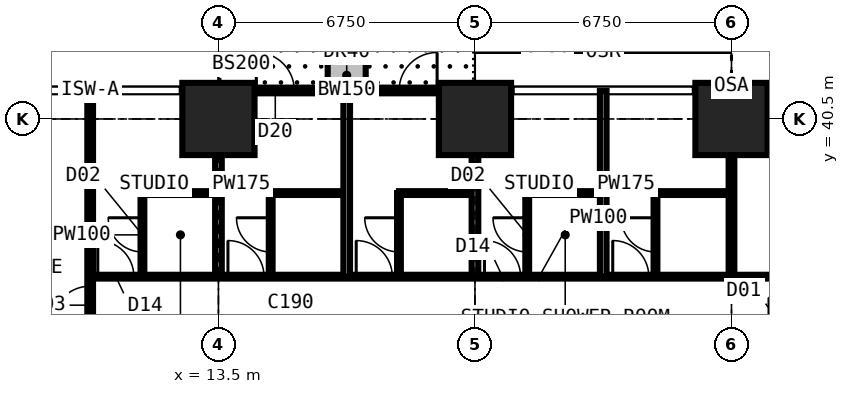
"""IFC4 building model, lengths in metres.
Left out: names, types, materials, properties, quantities, classifications, styles, units other than length and angle.
Written with IfcOpenShell. Run it as: python <this file> out.ifc"""

import sys

from ifc_helpers import new_model, si_unit, direction, frame, frame_2d, origin, origin_2d, place, context, subcontext, project, spatial, rectangle, extrude, element, fill, save


model = new_model("IFC4")
c1 = context("Model", 3, precision=1e-05, world=origin(), true_north=direction((0.0, 1.0)))
c2 = subcontext(c1, "Body", "Model", "MODEL_VIEW")
j1 = project(units=[si_unit("LENGTHUNIT", "METRE"), si_unit("PLANEANGLEUNIT", "RADIAN")], contexts=[c1])
p1 = place(None, origin())
s1 = spatial("IfcSite", under=j1, at=p1, CompositionType="ELEMENT")
p2 = place(p1, origin())
s2 = spatial("IfcBuilding", under=s1, at=p2, CompositionType="ELEMENT")
p3 = place(p2, frame((0.0, 0.0, 39.6)))
s3 = spatial("IfcBuildingStorey", under=s2, at=p3, CompositionType="ELEMENT", Elevation=39.6)
for number, where, z_axis, x_axis in (
    (1, (13.5, 40.5, 0.0), (0.0, 0.0, 1.0), (1.0, 0.0, 0.0)),
    (2, (20.25, 40.5, 0.0), (0.0, 0.0, 1.0), (1.0, 0.0, 0.0)),
    (3, (27.0, 40.5, 0.0), (0.0, 0.0, 1.0), (1.0, 0.0, 0.0)),
):
    element("IfcColumn", number, at=place(p3, frame(where, z_axis=z_axis, x_axis=x_axis)), inside=s3, PredefinedType="COLUMN", context=c2, shape_type="SweptSolid", body=[
        extrude(rectangle(XDim=1.9, YDim=1.9, at=origin_2d()), origin(), (0.0, 0.0, 1.0), 3.6),
    ])
p4 = place(p3, frame((13.5, 41.25, 0.0), z_axis=(0.0, 0.0, 1.0), x_axis=(1.0, 0.0, 0.0)))
e4 = element("IfcWall", 4, at=p4, inside=s3, PredefinedType="SOLIDWALL", context=c2, shape_type="SweptSolid", body=[
    extrude(rectangle(XDim=6.75, YDim=0.15, at=frame_2d((3.375, 0.0))), origin(), (0.0, 0.0, 1.0), 3.375),
])
p5 = place(p4, frame((0.996, 0.0, 0.0)))
e5 = element("IfcOpeningElement", 5, at=p5, cuts=e4, PredefinedType="OPENING", context=c2, shape_type="SweptSolid", body=[
    extrude(rectangle(XDim=1.0, YDim=2.2, at=frame_2d((0.5, 1.1))), frame((0.0, 0.085, 0.0), z_axis=(0.0, -1.0, 0.0), x_axis=(1.0, 0.0, 0.0)), (0.0, 0.0, 1.0), 0.17),
])
p6 = place(p4, frame((2.042, 0.0, 0.9)))
e6 = element("IfcOpeningElement", 6, at=p6, cuts=e4, PredefinedType="OPENING", context=c2, shape_type="SweptSolid", body=[
    extrude(rectangle(XDim=1.2, YDim=1.8, at=frame_2d((0.6, 0.9))), frame((0.0, 0.085, 0.0), z_axis=(0.0, -1.0, 0.0), x_axis=(1.0, 0.0, 0.0)), (0.0, 0.0, 1.0), 0.17),
])
p7 = place(p4, frame((4.754, 0.0, 0.0)))
e7 = element("IfcOpeningElement", 7, at=p7, cuts=e4, PredefinedType="OPENING", context=c2, shape_type="SweptSolid", body=[
    extrude(rectangle(XDim=1.0, YDim=2.2, at=frame_2d((0.5, 1.1))), frame((0.0, 0.085, 0.0), z_axis=(0.0, -1.0, 0.0), x_axis=(1.0, 0.0, 0.0)), (0.0, 0.0, 1.0), 0.17),
])
p8 = place(p4, frame((3.508, 0.0, 0.9)))
e8 = element("IfcOpeningElement", 8, at=p8, cuts=e4, PredefinedType="OPENING", context=c2, shape_type="SweptSolid", body=[
    extrude(rectangle(XDim=1.2, YDim=1.8, at=frame_2d((0.6, 0.9))), frame((0.0, 0.085, 0.0), z_axis=(0.0, -1.0, 0.0), x_axis=(1.0, 0.0, 0.0)), (0.0, 0.0, 1.0), 0.17),
])
p9 = place(p3, frame((16.875, 41.35, 0.0), z_axis=(0.0, 0.0, 1.0), x_axis=(0.0, 1.0, 0.0)))
e9 = element("IfcWall", 9, at=p9, inside=s3, PredefinedType="USERDEFINED", context=c2, shape_type="SweptSolid", body=[
    extrude(rectangle(XDim=2.2, YDim=1.0, at=frame_2d((1.1, 0.0))), origin(), (0.0, 0.0, 1.0), 0.9),
])
p10 = place(p3, frame((10.125, 30.375, 0.0), z_axis=(0.0, 0.0, 1.0), x_axis=(0.0, 1.0, 0.0)))
e10 = element("IfcWall", 10, at=p10, inside=s3, PredefinedType="PARTITIONING", context=c2, shape_type="SweptSolid", body=[
    extrude(rectangle(XDim=10.859, YDim=0.15, at=frame_2d((5.429, 0.0))), origin(), (0.0, 0.0, 1.0), 3.375),
])
p11 = place(p10, frame((4.725, 0.0, 0.0)))
e11 = element("IfcOpeningElement", 11, at=p11, cuts=e10, PredefinedType="OPENING", context=c2, shape_type="SweptSolid", body=[
    extrude(rectangle(XDim=1.0, YDim=2.2, at=frame_2d((0.5, 1.1))), frame((0.0, 0.085, 0.0), z_axis=(0.0, -1.0, 0.0), x_axis=(1.0, 0.0, 0.0)), (0.0, 0.0, 1.0), 0.17),
])
p12 = place(p3, frame((10.125, 36.35, 0.0), z_axis=(0.0, 0.0, 1.0), x_axis=(1.0, 0.0, 0.0)))
e12 = element("IfcWall", 12, at=p12, inside=s3, PredefinedType="PARTITIONING", context=c2, shape_type="SweptSolid", body=[
    extrude(rectangle(XDim=23.625, YDim=0.1, at=frame_2d((11.812, 0.0))), origin(), (0.0, 0.0, 1.0), 3.375),
])
p13 = place(p12, frame((0.2, 0.0, 0.0)))
e13 = element("IfcOpeningElement", 13, at=p13, cuts=e12, PredefinedType="OPENING", context=c2, shape_type="SweptSolid", body=[
    extrude(rectangle(XDim=0.95, YDim=2.2, at=frame_2d((0.475, 1.1))), frame((0.0, 0.06, 0.0), z_axis=(0.0, -1.0, 0.0), x_axis=(1.0, 0.0, 0.0)), (0.0, 0.0, 1.0), 0.12),
])
p14 = place(p12, frame((3.625, 0.0, 0.0)))
e14 = element("IfcOpeningElement", 14, at=p14, cuts=e12, PredefinedType="OPENING", context=c2, shape_type="SweptSolid", body=[
    extrude(rectangle(XDim=0.95, YDim=2.2, at=frame_2d((0.475, 1.1))), frame((0.0, 0.06, 0.0), z_axis=(0.0, -1.0, 0.0), x_axis=(1.0, 0.0, 0.0)), (0.0, 0.0, 1.0), 0.12),
])
p15 = place(p12, frame((7.0, 0.0, 0.0)))
e15 = element("IfcOpeningElement", 15, at=p15, cuts=e12, PredefinedType="OPENING", context=c2, shape_type="SweptSolid", body=[
    extrude(rectangle(XDim=0.95, YDim=2.2, at=frame_2d((0.475, 1.1))), frame((0.0, 0.06, 0.0), z_axis=(0.0, -1.0, 0.0), x_axis=(1.0, 0.0, 0.0)), (0.0, 0.0, 1.0), 0.12),
])
p16 = place(p12, frame((10.375, 0.0, 0.0)))
e16 = element("IfcOpeningElement", 16, at=p16, cuts=e12, PredefinedType="OPENING", context=c2, shape_type="SweptSolid", body=[
    extrude(rectangle(XDim=0.95, YDim=2.2, at=frame_2d((0.475, 1.1))), frame((0.0, 0.06, 0.0), z_axis=(0.0, -1.0, 0.0), x_axis=(1.0, 0.0, 0.0)), (0.0, 0.0, 1.0), 0.12),
])
p17 = place(p12, frame((13.75, 0.0, 0.0)))
e17 = element("IfcOpeningElement", 17, at=p17, cuts=e12, PredefinedType="OPENING", context=c2, shape_type="SweptSolid", body=[
    extrude(rectangle(XDim=0.95, YDim=2.2, at=frame_2d((0.475, 1.1))), frame((0.0, 0.06, 0.0), z_axis=(0.0, -1.0, 0.0), x_axis=(1.0, 0.0, 0.0)), (0.0, 0.0, 1.0), 0.12),
])
p18 = place(p3, frame((11.5, 36.35, 0.0), z_axis=(0.0, 0.0, 1.0), x_axis=(0.0, 1.0, 0.0)))
e18 = element("IfcWall", 18, at=p18, inside=s3, PredefinedType="PARTITIONING", context=c2, shape_type="SweptSolid", body=[
    extrude(rectangle(XDim=2.2, YDim=0.1, at=frame_2d((1.1, 0.0))), origin(), (0.0, 0.0, 1.0), 3.375),
])
p19 = place(p18, frame((0.65, 0.0, 0.0)))
e19 = element("IfcOpeningElement", 19, at=p19, cuts=e18, PredefinedType="OPENING", context=c2, shape_type="SweptSolid", body=[
    extrude(rectangle(XDim=0.9, YDim=2.2, at=frame_2d((0.45, 1.1))), frame((0.0, 0.06, 0.0), z_axis=(0.0, -1.0, 0.0), x_axis=(1.0, 0.0, 0.0)), (0.0, 0.0, 1.0), 0.12),
])
p20 = place(p3, frame((11.5, 38.55, 0.0), z_axis=(0.0, 0.0, 1.0), x_axis=(1.0, 0.0, 0.0)))
e20 = element("IfcWall", 20, at=p20, inside=s3, PredefinedType="PARTITIONING", context=c2, shape_type="SweptSolid", body=[
    extrude(rectangle(XDim=2.0, YDim=0.1, at=frame_2d((1.0, 0.0))), origin(), (0.0, 0.0, 1.0), 3.375),
])
p21 = place(p3, frame((13.5, 36.35, 0.0), z_axis=(0.0, 0.0, 1.0), x_axis=(0.0, 1.0, 0.0)))
e21 = element("IfcWall", 21, at=p21, inside=s3, PredefinedType="PARTITIONING", context=c2, shape_type="SweptSolid", body=[
    extrude(rectangle(XDim=4.884, YDim=0.175, at=frame_2d((2.442, 0.0))), origin(), (0.0, 0.0, 1.0), 2.877),
])
p22 = place(p3, frame((14.875, 36.35, 0.0), z_axis=(0.0, 0.0, 1.0), x_axis=(0.0, 1.0, 0.0)))
e22 = element("IfcWall", 22, at=p22, inside=s3, PredefinedType="PARTITIONING", context=c2, shape_type="SweptSolid", body=[
    extrude(rectangle(XDim=2.2, YDim=0.1, at=frame_2d((1.1, 0.0))), origin(), (0.0, 0.0, 1.0), 3.375),
])
p23 = place(p22, frame((0.65, 0.0, 0.0)))
e23 = element("IfcOpeningElement", 23, at=p23, cuts=e22, PredefinedType="OPENING", context=c2, shape_type="SweptSolid", body=[
    extrude(rectangle(XDim=0.9, YDim=2.2, at=frame_2d((0.45, 1.1))), frame((0.0, 0.06, 0.0), z_axis=(0.0, -1.0, 0.0), x_axis=(1.0, 0.0, 0.0)), (0.0, 0.0, 1.0), 0.12),
])
p24 = place(p3, frame((14.875, 38.55, 0.0), z_axis=(0.0, 0.0, 1.0), x_axis=(1.0, 0.0, 0.0)))
e24 = element("IfcWall", 24, at=p24, inside=s3, PredefinedType="PARTITIONING", context=c2, shape_type="SweptSolid", body=[
    extrude(rectangle(XDim=2.0, YDim=0.1, at=frame_2d((1.0, 0.0))), origin(), (0.0, 0.0, 1.0), 3.375),
])
p25 = place(p3, frame((16.875, 36.35, 0.0), z_axis=(0.0, 0.0, 1.0), x_axis=(0.0, 1.0, 0.0)))
e25 = element("IfcWall", 25, at=p25, inside=s3, PredefinedType="PARTITIONING", context=c2, shape_type="SweptSolid", body=[
    extrude(rectangle(XDim=4.884, YDim=0.175, at=frame_2d((2.442, 0.0))), origin(), (0.0, 0.0, 1.0), 3.375),
])
p26 = place(p3, frame((18.25, 36.35, 0.0), z_axis=(0.0, 0.0, 1.0), x_axis=(0.0, 1.0, 0.0)))
e26 = element("IfcWall", 26, at=p26, inside=s3, PredefinedType="PARTITIONING", context=c2, shape_type="SweptSolid", body=[
    extrude(rectangle(XDim=2.2, YDim=0.1, at=frame_2d((1.1, 0.0))), origin(), (0.0, 0.0, 1.0), 3.375),
])
p27 = place(p26, frame((0.65, 0.0, 0.0)))
e27 = element("IfcOpeningElement", 27, at=p27, cuts=e26, PredefinedType="OPENING", context=c2, shape_type="SweptSolid", body=[
    extrude(rectangle(XDim=0.9, YDim=2.2, at=frame_2d((0.45, 1.1))), frame((0.0, 0.06, 0.0), z_axis=(0.0, -1.0, 0.0), x_axis=(1.0, 0.0, 0.0)), (0.0, 0.0, 1.0), 0.12),
])
p28 = place(p3, frame((18.25, 38.55, 0.0), z_axis=(0.0, 0.0, 1.0), x_axis=(1.0, 0.0, 0.0)))
e28 = element("IfcWall", 28, at=p28, inside=s3, PredefinedType="PARTITIONING", context=c2, shape_type="SweptSolid", body=[
    extrude(rectangle(XDim=2.0, YDim=0.1, at=frame_2d((1.0, 0.0))), origin(), (0.0, 0.0, 1.0), 3.375),
])
p29 = place(p3, frame((20.25, 36.35, 0.0), z_axis=(0.0, 0.0, 1.0), x_axis=(0.0, 1.0, 0.0)))
e29 = element("IfcWall", 29, at=p29, inside=s3, PredefinedType="PARTITIONING", context=c2, shape_type="SweptSolid", body=[
    extrude(rectangle(XDim=4.884, YDim=0.175, at=frame_2d((2.442, 0.0))), origin(), (0.0, 0.0, 1.0), 2.61),
])
p30 = place(p3, frame((21.625, 36.35, 0.0), z_axis=(0.0, 0.0, 1.0), x_axis=(0.0, 1.0, 0.0)))
e30 = element("IfcWall", 30, at=p30, inside=s3, PredefinedType="PARTITIONING", context=c2, shape_type="SweptSolid", body=[
    extrude(rectangle(XDim=2.2, YDim=0.1, at=frame_2d((1.1, 0.0))), origin(), (0.0, 0.0, 1.0), 3.375),
])
p31 = place(p30, frame((0.65, 0.0, 0.0)))
e31 = element("IfcOpeningElement", 31, at=p31, cuts=e30, PredefinedType="OPENING", context=c2, shape_type="SweptSolid", body=[
    extrude(rectangle(XDim=0.9, YDim=2.2, at=frame_2d((0.45, 1.1))), frame((0.0, 0.06, 0.0), z_axis=(0.0, -1.0, 0.0), x_axis=(1.0, 0.0, 0.0)), (0.0, 0.0, 1.0), 0.12),
])
p32 = place(p3, frame((21.625, 38.55, 0.0), z_axis=(0.0, 0.0, 1.0), x_axis=(1.0, 0.0, 0.0)))
e32 = element("IfcWall", 32, at=p32, inside=s3, PredefinedType="PARTITIONING", context=c2, shape_type="SweptSolid", body=[
    extrude(rectangle(XDim=2.0, YDim=0.1, at=frame_2d((1.0, 0.0))), origin(), (0.0, 0.0, 1.0), 3.375),
])
p33 = place(p3, frame((23.625, 36.35, 0.0), z_axis=(0.0, 0.0, 1.0), x_axis=(0.0, 1.0, 0.0)))
e33 = element("IfcWall", 33, at=p33, inside=s3, PredefinedType="PARTITIONING", context=c2, shape_type="SweptSolid", body=[
    extrude(rectangle(XDim=4.884, YDim=0.175, at=frame_2d((2.442, 0.0))), origin(), (0.0, 0.0, 1.0), 3.375),
])
p34 = place(p3, frame((25.0, 36.35, 0.0), z_axis=(0.0, 0.0, 1.0), x_axis=(0.0, 1.0, 0.0)))
e34 = element("IfcWall", 34, at=p34, inside=s3, PredefinedType="PARTITIONING", context=c2, shape_type="SweptSolid", body=[
    extrude(rectangle(XDim=2.2, YDim=0.1, at=frame_2d((1.1, 0.0))), origin(), (0.0, 0.0, 1.0), 3.375),
])
p35 = place(p34, frame((0.65, 0.0, 0.0)))
e35 = element("IfcOpeningElement", 35, at=p35, cuts=e34, PredefinedType="OPENING", context=c2, shape_type="SweptSolid", body=[
    extrude(rectangle(XDim=0.9, YDim=2.2, at=frame_2d((0.45, 1.1))), frame((0.0, 0.06, 0.0), z_axis=(0.0, -1.0, 0.0), x_axis=(1.0, 0.0, 0.0)), (0.0, 0.0, 1.0), 0.12),
])
p36 = place(p3, frame((25.0, 38.55, 0.0), z_axis=(0.0, 0.0, 1.0), x_axis=(1.0, 0.0, 0.0)))
e36 = element("IfcWall", 36, at=p36, inside=s3, PredefinedType="PARTITIONING", context=c2, shape_type="SweptSolid", body=[
    extrude(rectangle(XDim=2.0, YDim=0.1, at=frame_2d((1.0, 0.0))), origin(), (0.0, 0.0, 1.0), 3.375),
])
p37 = place(p3, frame((27.0, 36.35, 0.0), z_axis=(0.0, 0.0, 1.0), x_axis=(0.0, 1.0, 0.0)))
e37 = element("IfcWall", 37, at=p37, inside=s3, PredefinedType="PARTITIONING", context=c2, shape_type="SweptSolid", body=[
    extrude(rectangle(XDim=4.884, YDim=0.15, at=frame_2d((2.442, 0.0))), origin(), (0.0, 0.0, 1.0), 2.61),
])
p38 = place(p5, origin())
e38 = element("IfcDoor", 38, at=p38, inside=s3, OperationType="SINGLE_SWING_LEFT", PredefinedType="DOOR", context=c2, shape_type="SweptSolid", body=[
    extrude(rectangle(XDim=1.0, YDim=2.2, at=frame_2d((0.5, 1.1))), frame((0.0, 0.025, 0.0), z_axis=(0.0, -1.0, 0.0), x_axis=(1.0, 0.0, 0.0)), (0.0, 0.0, 1.0), 0.05),
])
fill(e5, e38)
p39 = place(p6, origin())
e39 = element("IfcWindow", 39, at=p39, inside=s3, PartitioningType="SINGLE_PANEL", PredefinedType="WINDOW", context=c2, shape_type="SweptSolid", body=[
    extrude(rectangle(XDim=1.2, YDim=1.8, at=frame_2d((0.6, 0.9))), frame((0.0, 0.03, 0.0), z_axis=(0.0, -1.0, 0.0), x_axis=(1.0, 0.0, 0.0)), (0.0, 0.0, 1.0), 0.06),
])
fill(e6, e39)
p40 = place(p7, origin())
e40 = element("IfcDoor", 40, at=p40, inside=s3, OperationType="SINGLE_SWING_RIGHT", PredefinedType="DOOR", context=c2, shape_type="SweptSolid", body=[
    extrude(rectangle(XDim=1.0, YDim=2.2, at=frame_2d((0.5, 1.1))), frame((0.0, 0.025, 0.0), z_axis=(0.0, -1.0, 0.0), x_axis=(1.0, 0.0, 0.0)), (0.0, 0.0, 1.0), 0.05),
])
fill(e7, e40)
p41 = place(p8, origin())
e41 = element("IfcWindow", 41, at=p41, inside=s3, PartitioningType="SINGLE_PANEL", PredefinedType="WINDOW", context=c2, shape_type="SweptSolid", body=[
    extrude(rectangle(XDim=1.2, YDim=1.8, at=frame_2d((0.6, 0.9))), frame((0.0, 0.03, 0.0), z_axis=(0.0, -1.0, 0.0), x_axis=(1.0, 0.0, 0.0)), (0.0, 0.0, 1.0), 0.06),
])
fill(e8, e41)
p42 = place(p13, origin())
e42 = element("IfcDoor", 42, at=p42, inside=s3, OperationType="SINGLE_SWING_LEFT", PredefinedType="DOOR", context=c2, shape_type="SweptSolid", body=[
    extrude(rectangle(XDim=0.95, YDim=2.2, at=frame_2d((0.475, 1.1))), frame((0.0, 0.025, 0.0), z_axis=(0.0, -1.0, 0.0), x_axis=(1.0, 0.0, 0.0)), (0.0, 0.0, 1.0), 0.05),
])
fill(e13, e42)
p43 = place(p19, origin())
e43 = element("IfcDoor", 43, at=p43, inside=s3, OperationType="SINGLE_SWING_RIGHT", PredefinedType="DOOR", context=c2, shape_type="SweptSolid", body=[
    extrude(rectangle(XDim=0.9, YDim=2.2, at=frame_2d((0.45, 1.1))), frame((0.0, 0.025, 0.0), z_axis=(0.0, -1.0, 0.0), x_axis=(1.0, 0.0, 0.0)), (0.0, 0.0, 1.0), 0.05),
])
fill(e19, e43)
p44 = place(p14, origin())
e44 = element("IfcDoor", 44, at=p44, inside=s3, OperationType="SINGLE_SWING_LEFT", PredefinedType="DOOR", context=c2, shape_type="SweptSolid", body=[
    extrude(rectangle(XDim=0.95, YDim=2.2, at=frame_2d((0.475, 1.1))), frame((0.0, 0.025, 0.0), z_axis=(0.0, -1.0, 0.0), x_axis=(1.0, 0.0, 0.0)), (0.0, 0.0, 1.0), 0.05),
])
fill(e14, e44)
p45 = place(p23, origin())
e45 = element("IfcDoor", 45, at=p45, inside=s3, OperationType="SINGLE_SWING_RIGHT", PredefinedType="DOOR", context=c2, shape_type="SweptSolid", body=[
    extrude(rectangle(XDim=0.9, YDim=2.2, at=frame_2d((0.45, 1.1))), frame((0.0, 0.025, 0.0), z_axis=(0.0, -1.0, 0.0), x_axis=(1.0, 0.0, 0.0)), (0.0, 0.0, 1.0), 0.05),
])
fill(e23, e45)
p46 = place(p15, origin())
e46 = element("IfcDoor", 46, at=p46, inside=s3, OperationType="SINGLE_SWING_LEFT", PredefinedType="DOOR", context=c2, shape_type="SweptSolid", body=[
    extrude(rectangle(XDim=0.95, YDim=2.2, at=frame_2d((0.475, 1.1))), frame((0.0, 0.025, 0.0), z_axis=(0.0, -1.0, 0.0), x_axis=(1.0, 0.0, 0.0)), (0.0, 0.0, 1.0), 0.05),
])
fill(e15, e46)
p47 = place(p27, origin())
e47 = element("IfcDoor", 47, at=p47, inside=s3, OperationType="SINGLE_SWING_RIGHT", PredefinedType="DOOR", context=c2, shape_type="SweptSolid", body=[
    extrude(rectangle(XDim=0.9, YDim=2.2, at=frame_2d((0.45, 1.1))), frame((0.0, 0.025, 0.0), z_axis=(0.0, -1.0, 0.0), x_axis=(1.0, 0.0, 0.0)), (0.0, 0.0, 1.0), 0.05),
])
fill(e27, e47)
p48 = place(p16, origin())
e48 = element("IfcDoor", 48, at=p48, inside=s3, OperationType="SINGLE_SWING_LEFT", PredefinedType="DOOR", context=c2, shape_type="SweptSolid", body=[
    extrude(rectangle(XDim=0.95, YDim=2.2, at=frame_2d((0.475, 1.1))), frame((0.0, 0.025, 0.0), z_axis=(0.0, -1.0, 0.0), x_axis=(1.0, 0.0, 0.0)), (0.0, 0.0, 1.0), 0.05),
])
fill(e16, e48)
p49 = place(p31, origin())
e49 = element("IfcDoor", 49, at=p49, inside=s3, OperationType="SINGLE_SWING_RIGHT", PredefinedType="DOOR", context=c2, shape_type="SweptSolid", body=[
    extrude(rectangle(XDim=0.9, YDim=2.2, at=frame_2d((0.45, 1.1))), frame((0.0, 0.025, 0.0), z_axis=(0.0, -1.0, 0.0), x_axis=(1.0, 0.0, 0.0)), (0.0, 0.0, 1.0), 0.05),
])
fill(e31, e49)
p50 = place(p17, origin())
e50 = element("IfcDoor", 50, at=p50, inside=s3, OperationType="SINGLE_SWING_LEFT", PredefinedType="DOOR", context=c2, shape_type="SweptSolid", body=[
    extrude(rectangle(XDim=0.95, YDim=2.2, at=frame_2d((0.475, 1.1))), frame((0.0, 0.025, 0.0), z_axis=(0.0, -1.0, 0.0), x_axis=(1.0, 0.0, 0.0)), (0.0, 0.0, 1.0), 0.05),
])
fill(e17, e50)
p51 = place(p35, origin())
e51 = element("IfcDoor", 51, at=p51, inside=s3, OperationType="SINGLE_SWING_RIGHT", PredefinedType="DOOR", context=c2, shape_type="SweptSolid", body=[
    extrude(rectangle(XDim=0.9, YDim=2.2, at=frame_2d((0.45, 1.1))), frame((0.0, 0.025, 0.0), z_axis=(0.0, -1.0, 0.0), x_axis=(1.0, 0.0, 0.0)), (0.0, 0.0, 1.0), 0.05),
])
fill(e35, e51)
p52 = place(p11, origin())
e52 = element("IfcDoor", 52, at=p52, inside=s3, OperationType="SINGLE_SWING_LEFT", PredefinedType="DOOR", context=c2, shape_type="SweptSolid", body=[
    extrude(rectangle(XDim=1.0, YDim=2.2, at=frame_2d((0.5, 1.1))), frame((0.0, 0.025, 0.0), z_axis=(0.0, -1.0, 0.0), x_axis=(1.0, 0.0, 0.0)), (0.0, 0.0, 1.0), 0.05),
])
fill(e11, e52)
save(model, sys.argv[1])
